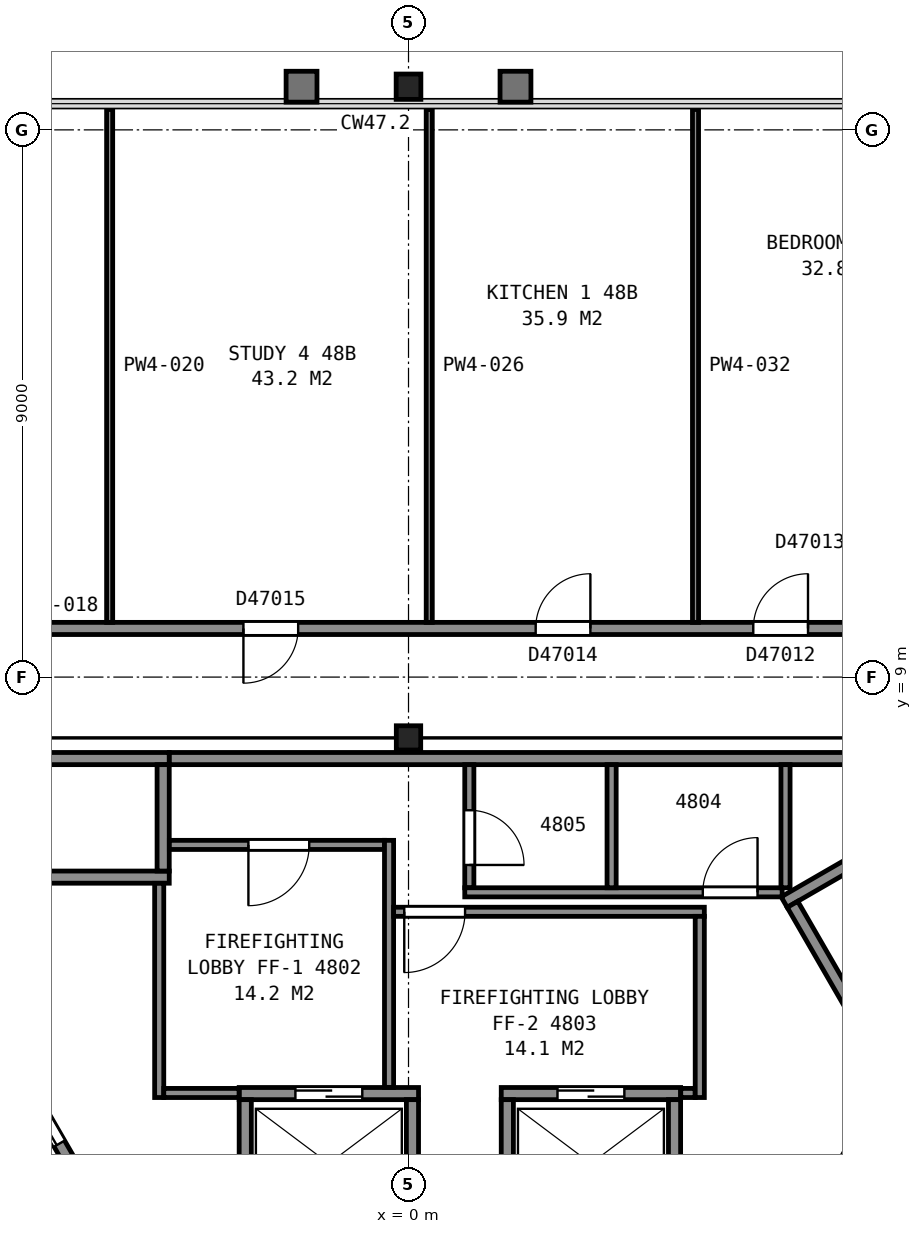
"""IFC4 building model, lengths in metres.
Left out: names, types, materials, properties, quantities, classifications, styles, units other than length and angle.
Written with IfcOpenShell. Run it as: python <this file> out.ifc"""

import sys

from ifc_helpers import new_model, si_unit, direction, frame, frame_2d, origin, origin_2d, place, context, subcontext, project, spatial, rectangle, i_section, extrude, element, fill, save


model = new_model("IFC4")
c1 = context("Model", 3, precision=1e-05, world=origin(), true_north=direction((0.0, 1.0)))
c2 = subcontext(c1, "Body", "Model", "MODEL_VIEW")
j1 = project(units=[si_unit("LENGTHUNIT", "METRE"), si_unit("PLANEANGLEUNIT", "RADIAN")], contexts=[c1])
p1 = place(None, origin())
s1 = spatial("IfcSite", under=j1, at=p1, CompositionType="ELEMENT")
p2 = place(p1, origin())
s2 = spatial("IfcBuilding", under=s1, at=p2, CompositionType="ELEMENT")
p3 = place(p2, frame((0.0, 0.0, 193.2)))
s3 = spatial("IfcBuildingStorey", under=s2, at=p3, CompositionType="ELEMENT", Elevation=193.2)
p4 = place(p3, frame((0.0, 18.71, 0.0), z_axis=(0.0, 0.0, 1.0), x_axis=(1.0, 0.0, 0.0)))
e1 = element("IfcColumn", 1, at=p4, inside=s3, PredefinedType="COLUMN", context=c2, shape_type="SweptSolid", body=[
    extrude(i_section(OverallWidth=0.406, OverallDepth=0.417, WebThickness=0.03, FlangeThickness=0.048, FilletRadius=0.015, at=origin_2d()), origin(), (0.0, 0.0, 1.0), 3.7),
])
p5 = place(p3, frame((0.0, 8.0, 0.0), z_axis=(0.0, 0.0, 1.0), x_axis=(1.0, 0.0, 0.0)))
e2 = element("IfcColumn", 2, at=p5, inside=s3, PredefinedType="COLUMN", context=c2, shape_type="SweptSolid", body=[
    extrude(i_section(OverallWidth=0.401, OverallDepth=0.399, WebThickness=0.025, FlangeThickness=0.04, FilletRadius=0.015, at=origin_2d()), origin(), (0.0, 0.0, 1.0), 3.7),
])
p6 = place(p3, frame((6.178, 5.299, 0.0), z_axis=(0.0, 0.0, 1.0), x_axis=(0.866019993635, 0.500009370536, 0.0)))
e3 = element("IfcWall", 3, at=p6, inside=s3, PredefinedType="PARTITIONING", context=c2, shape_type="SweptSolid", body=[
    extrude(rectangle(XDim=9.6, YDim=0.2, at=frame_2d((4.8, 0.0))), origin(), (0.0, 0.0, 1.0), 3.45),
])
p7 = place(p3, frame((7.715, 2.838, 0.0), z_axis=(0.0, 0.0, 1.0), x_axis=(-0.500049511043, 0.865996816683, 0.0)))
e4 = element("IfcWall", 4, at=p7, inside=s3, PredefinedType="PARTITIONING", context=c2, shape_type="SweptSolid", body=[
    extrude(rectangle(XDim=2.8, YDim=0.2, at=frame_2d((1.4, 0.0))), origin(), (0.0, 0.0, 1.0), 3.45),
])
p8 = place(p3, frame((-2.785, 2.15, 0.0), z_axis=(0.0, 0.0, 1.0), x_axis=(1.0, 0.0, 0.0)))
e5 = element("IfcWall", 5, at=p8, inside=s3, PredefinedType="PARTITIONING", context=c2, shape_type="SweptSolid", body=[
    extrude(rectangle(XDim=2.95, YDim=0.2, at=frame_2d((1.475, 0.0))), origin(), (0.0, 0.0, 1.0), 3.7),
])
p9 = place(p8, frame((0.925, 0.0, 0.0)))
e6 = element("IfcOpeningElement", 6, at=p9, cuts=e5, PredefinedType="OPENING", context=c2, shape_type="SweptSolid", body=[
    extrude(rectangle(XDim=1.1, YDim=2.1, at=frame_2d((0.55, 1.05))), frame((0.0, 0.11, 0.0), z_axis=(0.0, -1.0, 0.0), x_axis=(1.0, 0.0, 0.0)), (0.0, 0.0, 1.0), 0.22),
])
p10 = place(p3, frame((1.525, 2.15, 0.0), z_axis=(0.0, 0.0, 1.0), x_axis=(1.0, 0.0, 0.0)))
e7 = element("IfcWall", 7, at=p10, inside=s3, PredefinedType="PARTITIONING", context=c2, shape_type="SweptSolid", body=[
    extrude(rectangle(XDim=2.95, YDim=0.2, at=frame_2d((1.475, 0.0))), origin(), (0.0, 0.0, 1.0), 3.7),
])
p11 = place(p10, frame((0.925, 0.0, 0.0)))
e8 = element("IfcOpeningElement", 8, at=p11, cuts=e7, PredefinedType="OPENING", context=c2, shape_type="SweptSolid", body=[
    extrude(rectangle(XDim=1.1, YDim=2.1, at=frame_2d((0.55, 1.05))), frame((0.0, 0.11, 0.0), z_axis=(0.0, -1.0, 0.0), x_axis=(1.0, 0.0, 0.0)), (0.0, 0.0, 1.0), 0.22),
])
for number, where, z_axis, x_axis in (
    (9, (-6.285, 5.71, 0.0), (0.0, 0.0, 1.0), (1.0, 0.0, 0.0)),
    (10, (-6.285, 7.66, 0.0), (0.0, 0.0, 1.0), (1.0, 0.0, 0.0)),
):
    element("IfcWall", number, at=place(p3, frame(where, z_axis=z_axis, x_axis=x_axis)), inside=s3, PredefinedType="PARTITIONING", context=c2, shape_type="SweptSolid", body=[
        extrude(rectangle(XDim=2.35, YDim=0.2, at=frame_2d((1.175, 0.0))), origin(), (0.0, 0.0, 1.0), 3.7),
    ])
p12 = place(p3, frame((5.663, -1.612, 0.0), z_axis=(0.0, 0.0, 1.0), x_axis=(0.49998122708, 0.866036242063, 0.0)))
e11 = element("IfcWall", 11, at=p12, inside=s3, PredefinedType="PARTITIONING", context=c2, shape_type="SweptSolid", body=[
    extrude(rectangle(XDim=4.9, YDim=0.2, at=frame_2d((2.45, 0.0))), origin(), (0.0, 0.0, 1.0), 3.7),
])
for number, where, z_axis, x_axis in (
    (12, (4.375, 0.1, 0.0), (0.0, 0.0, 1.0), (0.0, 1.0, 0.0)),
    (13, (1.625, 0.1, 0.0), (0.0, 0.0, 1.0), (0.0, 1.0, 0.0)),
    (14, (0.065, 0.1, 0.0), (0.0, 0.0, 1.0), (0.0, 1.0, 0.0)),
    (15, (-2.685, 0.1, 0.0), (0.0, 0.0, 1.0), (0.0, 1.0, 0.0)),
):
    element("IfcWall", number, at=place(p3, frame(where, z_axis=z_axis, x_axis=x_axis)), inside=s3, PredefinedType="PARTITIONING", context=c2, shape_type="SweptSolid", body=[
        extrude(rectangle(XDim=1.95, YDim=0.2, at=frame_2d((0.975, 0.0))), origin(), (0.0, 0.0, 1.0), 3.7),
    ])
p13 = place(p3, frame((-4.035, 5.81, 0.0), z_axis=(0.0, 0.0, 1.0), x_axis=(0.0, 1.0, 0.0)))
e16 = element("IfcWall", 16, at=p13, inside=s3, PredefinedType="PARTITIONING", context=c2, shape_type="SweptSolid", body=[
    extrude(rectangle(XDim=1.75, YDim=0.2, at=frame_2d((0.875, 0.0))), origin(), (0.0, 0.0, 1.0), 3.7),
])
p14 = place(p3, frame((-5.28, 0.525, 0.0), z_axis=(0.0, 0.0, 1.0), x_axis=(-0.500037662692, 0.866003658127, 0.0)))
e17 = element("IfcWall", 17, at=p14, inside=s3, PredefinedType="PARTITIONING", context=c2, shape_type="SweptSolid", body=[
    extrude(rectangle(XDim=2.95, YDim=0.2, at=frame_2d((1.475, 0.0))), origin(), (0.0, 0.0, 1.0), 3.7),
])
p15 = place(p14, frame((0.925, 0.0, 0.0)))
e18 = element("IfcOpeningElement", 18, at=p15, cuts=e17, PredefinedType="OPENING", context=c2, shape_type="SweptSolid", body=[
    extrude(rectangle(XDim=1.1, YDim=2.1, at=frame_2d((0.55, 1.05))), frame((0.0, 0.11, 0.0), z_axis=(0.0, -1.0, 0.0), x_axis=(1.0, 0.0, 0.0)), (0.0, 0.0, 1.0), 0.22),
])
p16 = place(p3, frame((-4.1, 2.085, 0.0), z_axis=(0.0, 0.0, 1.0), x_axis=(0.0, 1.0, 0.0)))
e19 = element("IfcWall", 19, at=p16, inside=s3, PredefinedType="PARTITIONING", context=c2, shape_type="SweptSolid", body=[
    extrude(rectangle(XDim=3.523, YDim=0.15, at=frame_2d((1.761, 0.0))), origin(), (0.0, 0.0, 1.0), 3.45),
])
p17 = place(p3, frame((-4.025, 2.16, 0.0), z_axis=(0.0, 0.0, 1.0), x_axis=(1.0, 0.0, 0.0)))
e20 = element("IfcWall", 20, at=p17, inside=s3, PredefinedType="PARTITIONING", context=c2, shape_type="SweptSolid", body=[
    extrude(rectangle(XDim=1.238, YDim=0.15, at=frame_2d((0.619, 0.0))), origin(), (0.0, 0.0, 1.0), 3.45),
])
p18 = place(p3, frame((-3.933, 6.24, 0.0), z_axis=(0.0, 0.0, 1.0), x_axis=(1.0, 0.0, 0.0)))
e21 = element("IfcWall", 21, at=p18, inside=s3, PredefinedType="PARTITIONING", context=c2, shape_type="SweptSolid", body=[
    extrude(rectangle(XDim=3.538, YDim=0.15, at=frame_2d((1.769, 0.0))), origin(), (0.0, 0.0, 1.0), 3.45),
])
p19 = place(p18, frame((1.3, 0.0, 0.0)))
e22 = element("IfcOpeningElement", 22, at=p19, cuts=e21, PredefinedType="OPENING", context=c2, shape_type="SweptSolid", body=[
    extrude(rectangle(XDim=1.0, YDim=2.1, at=frame_2d((0.5, 1.05))), frame((0.0, 0.085, 0.0), z_axis=(0.0, -1.0, 0.0), x_axis=(1.0, 0.0, 0.0)), (0.0, 0.0, 1.0), 0.17),
])
p20 = place(p3, frame((-3.933, 7.66, 0.0), z_axis=(0.0, 0.0, 1.0), x_axis=(1.0, 0.0, 0.0)))
e23 = element("IfcWall", 23, at=p20, inside=s3, PredefinedType="PARTITIONING", context=c2, shape_type="SweptSolid", body=[
    extrude(rectangle(XDim=13.841, YDim=0.2, at=frame_2d((6.92, 0.0))), origin(), (0.0, 0.0, 1.0), 3.45),
])
p21 = place(p3, frame((-0.32, 2.252, 0.0), z_axis=(0.0, 0.0, 1.0), x_axis=(0.0, 1.0, 0.0)))
e24 = element("IfcWall", 24, at=p21, inside=s3, PredefinedType="PARTITIONING", context=c2, shape_type="SweptSolid", body=[
    extrude(rectangle(XDim=4.063, YDim=0.15, at=frame_2d((2.031, 0.0))), origin(), (0.0, 0.0, 1.0), 3.45),
])
p22 = place(p3, frame((-0.245, 5.14, 0.0), z_axis=(0.0, 0.0, 1.0), x_axis=(1.0, 0.0, 0.0)))
e25 = element("IfcWall", 25, at=p22, inside=s3, PredefinedType="PARTITIONING", context=c2, shape_type="SweptSolid", body=[
    extrude(rectangle(XDim=5.11, YDim=0.15, at=frame_2d((2.555, 0.0))), origin(), (0.0, 0.0, 1.0), 3.45),
])
p23 = place(p22, frame((0.175, 0.0, 0.0)))
e26 = element("IfcOpeningElement", 26, at=p23, cuts=e25, PredefinedType="OPENING", context=c2, shape_type="SweptSolid", body=[
    extrude(rectangle(XDim=1.0, YDim=2.1, at=frame_2d((0.5, 1.05))), frame((0.0, 0.085, 0.0), z_axis=(0.0, -1.0, 0.0), x_axis=(1.0, 0.0, 0.0)), (0.0, 0.0, 1.0), 0.17),
])
p24 = place(p3, frame((1.0, 7.56, 0.0), z_axis=(0.0, 0.0, 1.0), x_axis=(0.0, -1.0, 0.0)))
e27 = element("IfcWall", 27, at=p24, inside=s3, PredefinedType="PARTITIONING", context=c2, shape_type="SweptSolid", body=[
    extrude(rectangle(XDim=2.025, YDim=0.15, at=frame_2d((1.013, 0.0))), origin(), (0.0, 0.0, 1.0), 3.45),
])
p25 = place(p24, frame((0.75, 0.0, 0.0)))
e28 = element("IfcOpeningElement", 28, at=p25, cuts=e27, PredefinedType="OPENING", context=c2, shape_type="SweptSolid", body=[
    extrude(rectangle(XDim=0.9, YDim=2.1, at=frame_2d((0.45, 1.05))), frame((0.0, 0.085, 0.0), z_axis=(0.0, -1.0, 0.0), x_axis=(1.0, 0.0, 0.0)), (0.0, 0.0, 1.0), 0.17),
])
p26 = place(p3, frame((0.925, 5.46, 0.0), z_axis=(0.0, 0.0, 1.0), x_axis=(1.0, 0.0, 0.0)))
e29 = element("IfcWall", 29, at=p26, inside=s3, PredefinedType="PARTITIONING", context=c2, shape_type="SweptSolid", body=[
    extrude(rectangle(XDim=5.22, YDim=0.15, at=frame_2d((2.61, 0.0))), origin(), (0.0, 0.0, 1.0), 3.45),
])
p27 = place(p26, frame((3.915, 0.0, 0.0)))
e30 = element("IfcOpeningElement", 30, at=p27, cuts=e29, PredefinedType="OPENING", context=c2, shape_type="SweptSolid", body=[
    extrude(rectangle(XDim=0.9, YDim=2.1, at=frame_2d((0.45, 1.05))), frame((0.0, 0.085, 0.0), z_axis=(0.0, -1.0, 0.0), x_axis=(1.0, 0.0, 0.0)), (0.0, 0.0, 1.0), 0.17),
])
p28 = place(p3, frame((3.34, 5.535, 0.0), z_axis=(0.0, 0.0, 1.0), x_axis=(0.0, 1.0, 0.0)))
e31 = element("IfcWall", 31, at=p28, inside=s3, PredefinedType="PARTITIONING", context=c2, shape_type="SweptSolid", body=[
    extrude(rectangle(XDim=2.025, YDim=0.15, at=frame_2d((1.013, 0.0))), origin(), (0.0, 0.0, 1.0), 3.45),
])
p29 = place(p3, frame((4.477, 2.16, 0.0), z_axis=(0.0, 0.0, 1.0), x_axis=(1.0, 0.0, 0.0)))
e32 = element("IfcWall", 32, at=p29, inside=s3, PredefinedType="PARTITIONING", context=c2, shape_type="SweptSolid", body=[
    extrude(rectangle(XDim=0.238, YDim=0.15, at=frame_2d((0.119, 0.0))), origin(), (0.0, 0.0, 1.0), 3.45),
])
p30 = place(p3, frame((4.79, 2.085, 0.0), z_axis=(0.0, 0.0, 1.0), x_axis=(0.0, 1.0, 0.0)))
e33 = element("IfcWall", 33, at=p30, inside=s3, PredefinedType="PARTITIONING", context=c2, shape_type="SweptSolid", body=[
    extrude(rectangle(XDim=2.98, YDim=0.15, at=frame_2d((1.49, 0.0))), origin(), (0.0, 0.0, 1.0), 3.45),
])
p31 = place(p3, frame((6.2, 5.535, 0.0), z_axis=(0.0, 0.0, 1.0), x_axis=(0.0, 1.0, 0.0)))
e34 = element("IfcWall", 34, at=p31, inside=s3, PredefinedType="PARTITIONING", context=c2, shape_type="SweptSolid", body=[
    extrude(rectangle(XDim=2.025, YDim=0.15, at=frame_2d((1.013, 0.0))), origin(), (0.0, 0.0, 1.0), 3.45),
])
p32 = place(p3, frame((-4.075, -12.545, 0.0), z_axis=(0.0, 0.0, 1.0), x_axis=(-0.499999743747, 0.866025551732, 0.0)))
e35 = element("IfcWall", 35, at=p32, inside=s3, PredefinedType="PARTITIONING", context=c2, shape_type="SweptSolid", body=[
    extrude(rectangle(XDim=17.656, YDim=0.2, at=frame_2d((8.828, 0.0))), origin(), (0.0, 0.0, 1.0), 2.713),
])
p33 = place(p32, frame((10.83, 0.0, 0.0)))
e36 = element("IfcOpeningElement", 36, at=p33, cuts=e35, PredefinedType="OPENING", context=c2, shape_type="SweptSolid", body=[
    extrude(rectangle(XDim=0.9, YDim=2.1, at=frame_2d((0.45, 1.05))), frame((0.0, 0.11, 0.0), z_axis=(0.0, -1.0, 0.0), x_axis=(1.0, 0.0, 0.0)), (0.0, 0.0, 1.0), 0.22),
])
p34 = place(p32, frame((7.148, 0.0, 0.0)))
e37 = element("IfcOpeningElement", 37, at=p34, cuts=e35, PredefinedType="OPENING", context=c2, shape_type="SweptSolid", body=[
    extrude(rectangle(XDim=0.9, YDim=2.1, at=frame_2d((0.45, 1.05))), frame((0.0, 0.11, 0.0), z_axis=(0.0, -1.0, 0.0), x_axis=(1.0, 0.0, 0.0)), (0.0, 0.0, 1.0), 0.22),
])
p35 = place(p32, frame((2.198, 0.0, 0.0)))
e38 = element("IfcOpeningElement", 38, at=p35, cuts=e35, PredefinedType="OPENING", context=c2, shape_type="SweptSolid", body=[
    extrude(rectangle(XDim=0.9, YDim=2.1, at=frame_2d((0.45, 1.05))), frame((0.0, 0.11, 0.0), z_axis=(0.0, -1.0, 0.0), x_axis=(1.0, 0.0, 0.0)), (0.0, 0.0, 1.0), 0.22),
])
p36 = place(p3, frame((-8.828, 9.8, 0.0), z_axis=(0.0, 0.0, 1.0), x_axis=(1.0, 0.0, 0.0)))
e39 = element("IfcWall", 39, at=p36, inside=s3, PredefinedType="PARTITIONING", context=c2, shape_type="SweptSolid", body=[
    extrude(rectangle(XDim=17.706, YDim=0.2, at=frame_2d((8.853, 0.0))), origin(), (0.0, 0.0, 1.0), 2.713),
])
p37 = place(p36, frame((14.498, 0.0, 0.0)))
e40 = element("IfcOpeningElement", 40, at=p37, cuts=e39, PredefinedType="OPENING", context=c2, shape_type="SweptSolid", body=[
    extrude(rectangle(XDim=0.9, YDim=2.1, at=frame_2d((0.45, 1.05))), frame((0.0, 0.11, 0.0), z_axis=(0.0, -1.0, 0.0), x_axis=(1.0, 0.0, 0.0)), (0.0, 0.0, 1.0), 0.22),
])
p38 = place(p36, frame((10.919, 0.0, 0.0)))
e41 = element("IfcOpeningElement", 41, at=p38, cuts=e39, PredefinedType="OPENING", context=c2, shape_type="SweptSolid", body=[
    extrude(rectangle(XDim=0.9, YDim=2.1, at=frame_2d((0.45, 1.05))), frame((0.0, 0.11, 0.0), z_axis=(0.0, -1.0, 0.0), x_axis=(1.0, 0.0, 0.0)), (0.0, 0.0, 1.0), 0.22),
])
p39 = place(p36, frame((6.113, 0.0, 0.0)))
e42 = element("IfcOpeningElement", 42, at=p39, cuts=e39, PredefinedType="OPENING", context=c2, shape_type="SweptSolid", body=[
    extrude(rectangle(XDim=0.9, YDim=2.1, at=frame_2d((0.45, 1.05))), frame((0.0, 0.11, 0.0), z_axis=(0.0, -1.0, 0.0), x_axis=(1.0, 0.0, 0.0)), (0.0, 0.0, 1.0), 0.22),
])
for number, where, z_axis, x_axis in (
    (43, (-4.915, 9.9, 0.0), (0.0, 0.0, 1.0), (0.0, 1.0, 0.0)),
    (44, (0.341, 9.9, 0.0), (0.0, 0.0, 1.0), (0.0, 1.0, 0.0)),
    (45, (4.72, 9.9, 0.0), (0.0, 0.0, 1.0), (0.0, 1.0, 0.0)),
):
    element("IfcWall", number, at=place(p3, frame(where, z_axis=z_axis, x_axis=x_axis)), inside=s3, PredefinedType="PARTITIONING", context=c2, shape_type="SweptSolid", body=[
        extrude(rectangle(XDim=8.435, YDim=0.1, at=frame_2d((4.218, 0.0))), origin(), (0.0, 0.0, 1.0), 2.713),
    ])
p40 = place(p3, frame((12.903, 2.745, 0.0), z_axis=(0.0, 0.0, 1.0), x_axis=(-0.499992063946, -0.866029985619, 0.0)))
e46 = element("IfcWall", 46, at=p40, inside=s3, PredefinedType="PARTITIONING", context=c2, shape_type="SweptSolid", body=[
    extrude(rectangle(XDim=12.907, YDim=0.2, at=frame_2d((6.454, 0.0))), origin(), (0.0, 0.0, 1.0), 2.713),
])
p41 = place(p40, frame((9.032, 0.0, 0.0)))
e47 = element("IfcOpeningElement", 47, at=p41, cuts=e46, PredefinedType="OPENING", context=c2, shape_type="SweptSolid", body=[
    extrude(rectangle(XDim=0.9, YDim=2.1, at=frame_2d((0.45, 1.05))), frame((0.0, 0.11, 0.0), z_axis=(0.0, -1.0, 0.0), x_axis=(1.0, 0.0, 0.0)), (0.0, 0.0, 1.0), 0.22),
])
p42 = place(p40, frame((5.349, 0.0, 0.0)))
e48 = element("IfcOpeningElement", 48, at=p42, cuts=e46, PredefinedType="OPENING", context=c2, shape_type="SweptSolid", body=[
    extrude(rectangle(XDim=0.9, YDim=2.1, at=frame_2d((0.45, 1.05))), frame((0.0, 0.11, 0.0), z_axis=(0.0, -1.0, 0.0), x_axis=(1.0, 0.0, 0.0)), (0.0, 0.0, 1.0), 0.22),
])
p43 = place(p9, origin())
e49 = element("IfcDoor", 49, at=p43, inside=s3, OperationType="SLIDING_TO_LEFT", PredefinedType="DOOR", context=c2, shape_type="SweptSolid", body=[
    extrude(rectangle(XDim=1.1, YDim=2.1, at=frame_2d((0.55, 1.05))), frame((0.0, 0.025, 0.0), z_axis=(0.0, -1.0, 0.0), x_axis=(1.0, 0.0, 0.0)), (0.0, 0.0, 1.0), 0.05),
])
fill(e6, e49)
p44 = place(p11, origin())
e50 = element("IfcDoor", 50, at=p44, inside=s3, OperationType="SLIDING_TO_RIGHT", PredefinedType="DOOR", context=c2, shape_type="SweptSolid", body=[
    extrude(rectangle(XDim=1.1, YDim=2.1, at=frame_2d((0.55, 1.05))), frame((0.0, 0.025, 0.0), z_axis=(0.0, -1.0, 0.0), x_axis=(1.0, 0.0, 0.0)), (0.0, 0.0, 1.0), 0.05),
])
fill(e8, e50)
p45 = place(p15, origin())
e51 = element("IfcDoor", 51, at=p45, inside=s3, OperationType="SLIDING_TO_LEFT", PredefinedType="DOOR", context=c2, shape_type="SweptSolid", body=[
    extrude(rectangle(XDim=1.1, YDim=2.1, at=frame_2d((0.55, 1.05))), frame((0.0, 0.025, 0.0), z_axis=(0.0, -1.0, 0.0), x_axis=(1.0, 0.0, 0.0)), (0.0, 0.0, 1.0), 0.05),
])
fill(e18, e51)
p46 = place(p19, origin())
e52 = element("IfcDoor", 52, at=p46, inside=s3, OperationType="SINGLE_SWING_LEFT", PredefinedType="DOOR", context=c2, shape_type="SweptSolid", body=[
    extrude(rectangle(XDim=1.0, YDim=2.1, at=frame_2d((0.5, 1.05))), frame((0.0, 0.025, 0.0), z_axis=(0.0, -1.0, 0.0), x_axis=(1.0, 0.0, 0.0)), (0.0, 0.0, 1.0), 0.05),
])
fill(e22, e52)
p47 = place(p23, origin())
e53 = element("IfcDoor", 53, at=p47, inside=s3, OperationType="SINGLE_SWING_LEFT", PredefinedType="DOOR", context=c2, shape_type="SweptSolid", body=[
    extrude(rectangle(XDim=1.0, YDim=2.1, at=frame_2d((0.5, 1.05))), frame((0.0, 0.025, 0.0), z_axis=(0.0, -1.0, 0.0), x_axis=(1.0, 0.0, 0.0)), (0.0, 0.0, 1.0), 0.05),
])
fill(e26, e53)
p48 = place(p25, origin())
e54 = element("IfcDoor", 54, at=p48, inside=s3, OperationType="SINGLE_SWING_RIGHT", PredefinedType="DOOR", context=c2, shape_type="SweptSolid", body=[
    extrude(rectangle(XDim=0.9, YDim=2.1, at=frame_2d((0.45, 1.05))), frame((0.0, 0.025, 0.0), z_axis=(0.0, -1.0, 0.0), x_axis=(1.0, 0.0, 0.0)), (0.0, 0.0, 1.0), 0.05),
])
fill(e28, e54)
p49 = place(p27, origin())
e55 = element("IfcDoor", 55, at=p49, inside=s3, OperationType="SINGLE_SWING_RIGHT", PredefinedType="DOOR", context=c2, shape_type="SweptSolid", body=[
    extrude(rectangle(XDim=0.9, YDim=2.1, at=frame_2d((0.45, 1.05))), frame((0.0, 0.025, 0.0), z_axis=(0.0, -1.0, 0.0), x_axis=(1.0, 0.0, 0.0)), (0.0, 0.0, 1.0), 0.05),
])
fill(e30, e55)
p50 = place(p37, origin())
e56 = element("IfcDoor", 56, at=p50, inside=s3, OperationType="SINGLE_SWING_RIGHT", PredefinedType="DOOR", context=c2, shape_type="SweptSolid", body=[
    extrude(rectangle(XDim=0.9, YDim=2.1, at=frame_2d((0.45, 1.05))), frame((0.0, 0.025, 0.0), z_axis=(0.0, -1.0, 0.0), x_axis=(1.0, 0.0, 0.0)), (0.0, 0.0, 1.0), 0.05),
])
fill(e40, e56)
p51 = place(p38, origin())
e57 = element("IfcDoor", 57, at=p51, inside=s3, OperationType="SINGLE_SWING_RIGHT", PredefinedType="DOOR", context=c2, shape_type="SweptSolid", body=[
    extrude(rectangle(XDim=0.9, YDim=2.1, at=frame_2d((0.45, 1.05))), frame((0.0, 0.025, 0.0), z_axis=(0.0, -1.0, 0.0), x_axis=(1.0, 0.0, 0.0)), (0.0, 0.0, 1.0), 0.05),
])
fill(e41, e57)
p52 = place(p39, origin())
e58 = element("IfcDoor", 58, at=p52, inside=s3, OperationType="SINGLE_SWING_LEFT", PredefinedType="DOOR", context=c2, shape_type="SweptSolid", body=[
    extrude(rectangle(XDim=0.9, YDim=2.1, at=frame_2d((0.45, 1.05))), frame((0.0, 0.025, 0.0), z_axis=(0.0, -1.0, 0.0), x_axis=(1.0, 0.0, 0.0)), (0.0, 0.0, 1.0), 0.05),
])
fill(e42, e58)
save(model, sys.argv[1])
